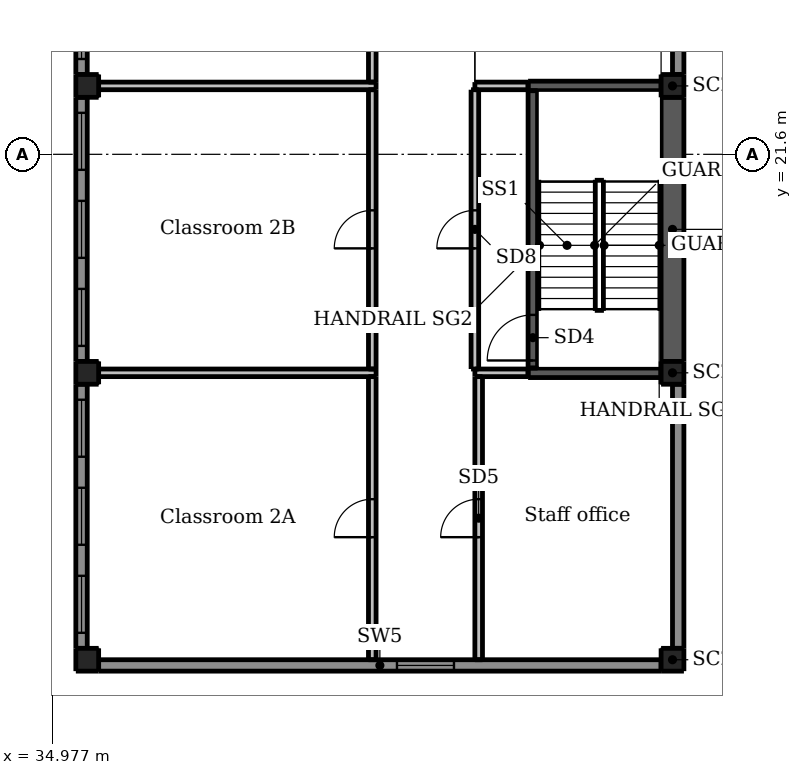
"""IFC4 building model, lengths in metres.
Left out: names, types, materials, properties, quantities, classifications, styles, units other than length and angle.
Written with IfcOpenShell. Run it as: python <this file> out.ifc"""

import sys

from ifc_helpers import new_model, si_unit, direction, frame, frame_2d, origin, origin_2d, place, context, subcontext, project, spatial, rectangle, extrude, element, fill, save


model = new_model("IFC4")
c1 = context("Model", 3, precision=1e-05, world=origin(), true_north=direction((0.0, 1.0)))
c2 = subcontext(c1, "Body", "Model", "MODEL_VIEW")
j1 = project(units=[si_unit("LENGTHUNIT", "METRE"), si_unit("PLANEANGLEUNIT", "RADIAN")], contexts=[c1])
p1 = place(None, origin())
s1 = spatial("IfcSite", under=j1, at=p1, CompositionType="ELEMENT")
p2 = place(p1, origin())
s2 = spatial("IfcBuilding", under=s1, at=p2, CompositionType="ELEMENT")
p3 = place(p2, frame((0.0, 0.0, 10.0)))
s3 = spatial("IfcBuildingStorey", under=s2, at=p3, CompositionType="ELEMENT", Elevation=10.0)
for number, where, z_axis, x_axis in (
    (1, (35.9, 8.3, -0.3), (0.0, 0.0, 1.0), (1.0, 0.0, 0.0)),
    (2, (51.3, 8.3, -0.3), (0.0, 0.0, 1.0), (1.0, 0.0, 0.0)),
    (3, (35.9, 15.85, -0.3), (0.0, 0.0, 1.0), (1.0, 0.0, 0.0)),
    (4, (51.3, 15.85, -0.3), (0.0, 0.0, 1.0), (1.0, 0.0, 0.0)),
    (5, (35.9, 23.4, -0.3), (0.0, 0.0, 1.0), (1.0, 0.0, 0.0)),
    (6, (51.3, 23.4, -0.3), (0.0, 0.0, 1.0), (1.0, 0.0, 0.0)),
):
    element("IfcColumn", number, at=place(p3, frame(where, z_axis=z_axis, x_axis=x_axis)), inside=s3, PredefinedType="COLUMN", context=c2, shape_type="SweptSolid", body=[
        extrude(rectangle(XDim=0.6, YDim=0.6, at=origin_2d()), origin(), (0.0, 0.0, 1.0), 4.5),
    ])
p4 = place(p3, frame((47.625, 15.975, -0.3), z_axis=(0.0, 0.0, 1.0), x_axis=(0.0, 1.0, 0.0)))
e7 = element("IfcWall", 7, at=p4, inside=s3, PredefinedType="SHEAR", context=c2, shape_type="SweptSolid", body=[
    extrude(rectangle(XDim=7.3, YDim=0.25, at=frame_2d((3.65, 0.0))), origin(), (0.0, 0.0, 1.0), 4.5),
])
p5 = place(p4, frame((0.2, 0.0, 0.3)))
e8 = element("IfcOpeningElement", 8, at=p5, cuts=e7, PredefinedType="OPENING", context=c2, shape_type="SweptSolid", body=[
    extrude(rectangle(XDim=1.2, YDim=2.1, at=frame_2d((0.6, 1.05))), frame((0.0, 0.135, 0.0), z_axis=(0.0, -1.0, 0.0), x_axis=(1.0, 0.0, 0.0)), (0.0, 0.0, 1.0), 0.27),
])
for number, where, z_axis, x_axis in (
    (9, (47.5, 15.85, -0.3), (0.0, 0.0, 1.0), (1.0, 0.0, 0.0)),
    (10, (47.5, 23.4, -0.3), (0.0, 0.0, 1.0), (1.0, 0.0, 0.0)),
):
    element("IfcWall", number, at=place(p3, frame(where, z_axis=z_axis, x_axis=x_axis)), inside=s3, PredefinedType="SHEAR", context=c2, shape_type="SweptSolid", body=[
        extrude(rectangle(XDim=3.5, YDim=0.25, at=frame_2d((1.75, 0.0))), origin(), (0.0, 0.0, 1.0), 4.5),
    ])
p6 = place(p3, frame((51.3, 16.15, -0.3), z_axis=(0.0, 0.0, 1.0), x_axis=(0.0, 1.0, 0.0)))
e11 = element("IfcWall", 11, at=p6, inside=s3, PredefinedType="SHEAR", context=c2, shape_type="SweptSolid", body=[
    extrude(rectangle(XDim=6.95, YDim=0.6, at=frame_2d((3.475, 0.0))), origin(), (0.0, 0.0, 1.0), 4.5),
])
p7 = place(p3, frame((52.125, 20.0, 0.0), z_axis=(0.0, 0.0, 1.0), x_axis=(0.0, 1.0, 0.0)))
e12 = element("IfcWall", 12, at=p7, inside=s3, PredefinedType="SOLIDWALL", context=c2, shape_type="SweptSolid", body=[
    extrude(rectangle(XDim=9.8, YDim=0.25, at=frame_2d((4.9, 0.0))), origin(), (0.0, 0.0, 1.0), 4.2),
])
p8 = place(p3, frame((35.75, 8.6, 0.0), z_axis=(0.0, 0.0, 1.0), x_axis=(0.0, 1.0, 0.0)))
e13 = element("IfcWall", 13, at=p8, inside=s3, PredefinedType="SOLIDWALL", context=c2, shape_type="SweptSolid", body=[
    extrude(rectangle(XDim=6.95, YDim=0.3, at=frame_2d((3.475, 0.0))), origin(), (0.0, 0.0, 1.0), 3.3),
])
p9 = place(p8, frame((0.408, 0.0, 0.9)))
e14 = element("IfcOpeningElement", 14, at=p9, cuts=e13, PredefinedType="OPENING", context=c2, shape_type="SweptSolid", body=[
    extrude(rectangle(XDim=1.5, YDim=1.5, at=frame_2d((0.75, 0.75))), frame((0.0, 0.16, 0.0), z_axis=(0.0, -1.0, 0.0), x_axis=(1.0, 0.0, 0.0)), (0.0, 0.0, 1.0), 0.32),
])
p10 = place(p8, frame((2.725, 0.0, 0.9)))
e15 = element("IfcOpeningElement", 15, at=p10, cuts=e13, PredefinedType="OPENING", context=c2, shape_type="SweptSolid", body=[
    extrude(rectangle(XDim=1.5, YDim=1.5, at=frame_2d((0.75, 0.75))), frame((0.0, 0.16, 0.0), z_axis=(0.0, -1.0, 0.0), x_axis=(1.0, 0.0, 0.0)), (0.0, 0.0, 1.0), 0.32),
])
p11 = place(p8, frame((5.042, 0.0, 0.9)))
e16 = element("IfcOpeningElement", 16, at=p11, cuts=e13, PredefinedType="OPENING", context=c2, shape_type="SweptSolid", body=[
    extrude(rectangle(XDim=1.5, YDim=1.5, at=frame_2d((0.75, 0.75))), frame((0.0, 0.16, 0.0), z_axis=(0.0, -1.0, 0.0), x_axis=(1.0, 0.0, 0.0)), (0.0, 0.0, 1.0), 0.32),
])
p12 = place(p3, frame((35.75, 16.15, 0.0), z_axis=(0.0, 0.0, 1.0), x_axis=(0.0, 1.0, 0.0)))
e17 = element("IfcWall", 17, at=p12, inside=s3, PredefinedType="SOLIDWALL", context=c2, shape_type="SweptSolid", body=[
    extrude(rectangle(XDim=6.95, YDim=0.3, at=frame_2d((3.475, 0.0))), origin(), (0.0, 0.0, 1.0), 3.3),
])
p13 = place(p12, frame((0.408, 0.0, 0.9)))
e18 = element("IfcOpeningElement", 18, at=p13, cuts=e17, PredefinedType="OPENING", context=c2, shape_type="SweptSolid", body=[
    extrude(rectangle(XDim=1.5, YDim=1.5, at=frame_2d((0.75, 0.75))), frame((0.0, 0.16, 0.0), z_axis=(0.0, -1.0, 0.0), x_axis=(1.0, 0.0, 0.0)), (0.0, 0.0, 1.0), 0.32),
])
p14 = place(p12, frame((2.725, 0.0, 0.9)))
e19 = element("IfcOpeningElement", 19, at=p14, cuts=e17, PredefinedType="OPENING", context=c2, shape_type="SweptSolid", body=[
    extrude(rectangle(XDim=1.5, YDim=1.5, at=frame_2d((0.75, 0.75))), frame((0.0, 0.16, 0.0), z_axis=(0.0, -1.0, 0.0), x_axis=(1.0, 0.0, 0.0)), (0.0, 0.0, 1.0), 0.32),
])
p15 = place(p12, frame((5.042, 0.0, 0.9)))
e20 = element("IfcOpeningElement", 20, at=p15, cuts=e17, PredefinedType="OPENING", context=c2, shape_type="SweptSolid", body=[
    extrude(rectangle(XDim=1.5, YDim=1.5, at=frame_2d((0.75, 0.75))), frame((0.0, 0.16, 0.0), z_axis=(0.0, -1.0, 0.0), x_axis=(1.0, 0.0, 0.0)), (0.0, 0.0, 1.0), 0.32),
])
p16 = place(p3, frame((35.75, 23.7, 0.0), z_axis=(0.0, 0.0, 1.0), x_axis=(0.0, 1.0, 0.0)))
e21 = element("IfcWall", 21, at=p16, inside=s3, PredefinedType="SOLIDWALL", context=c2, shape_type="SweptSolid", body=[
    extrude(rectangle(XDim=6.95, YDim=0.3, at=frame_2d((3.475, 0.0))), origin(), (0.0, 0.0, 1.0), 3.3),
])
p17 = place(p16, frame((0.408, 0.0, 0.9)))
e22 = element("IfcOpeningElement", 22, at=p17, cuts=e21, PredefinedType="OPENING", context=c2, shape_type="SweptSolid", body=[
    extrude(rectangle(XDim=1.5, YDim=1.5, at=frame_2d((0.75, 0.75))), frame((0.0, 0.16, 0.0), z_axis=(0.0, -1.0, 0.0), x_axis=(1.0, 0.0, 0.0)), (0.0, 0.0, 1.0), 0.32),
])
p18 = place(p16, frame((2.725, 0.0, 0.9)))
e23 = element("IfcOpeningElement", 23, at=p18, cuts=e21, PredefinedType="OPENING", context=c2, shape_type="SweptSolid", body=[
    extrude(rectangle(XDim=1.5, YDim=1.5, at=frame_2d((0.75, 0.75))), frame((0.0, 0.16, 0.0), z_axis=(0.0, -1.0, 0.0), x_axis=(1.0, 0.0, 0.0)), (0.0, 0.0, 1.0), 0.32),
])
p19 = place(p16, frame((5.042, 0.0, 0.9)))
e24 = element("IfcOpeningElement", 24, at=p19, cuts=e21, PredefinedType="OPENING", context=c2, shape_type="SweptSolid", body=[
    extrude(rectangle(XDim=1.5, YDim=1.5, at=frame_2d((0.75, 0.75))), frame((0.0, 0.16, 0.0), z_axis=(0.0, -1.0, 0.0), x_axis=(1.0, 0.0, 0.0)), (0.0, 0.0, 1.0), 0.32),
])
p20 = place(p3, frame((36.2, 8.15, 0.0), z_axis=(0.0, 0.0, 1.0), x_axis=(1.0, 0.0, 0.0)))
e25 = element("IfcWall", 25, at=p20, inside=s3, PredefinedType="SOLIDWALL", context=c2, shape_type="SweptSolid", body=[
    extrude(rectangle(XDim=14.8, YDim=0.3, at=frame_2d((7.4, 0.0))), origin(), (0.0, 0.0, 1.0), 3.1),
])
p21 = place(p20, frame((7.85, 0.0, 0.9)))
e26 = element("IfcOpeningElement", 26, at=p21, cuts=e25, PredefinedType="OPENING", context=c2, shape_type="SweptSolid", body=[
    extrude(rectangle(XDim=1.5, YDim=1.5, at=frame_2d((0.75, 0.75))), frame((0.0, 0.16, 0.0), z_axis=(0.0, -1.0, 0.0), x_axis=(1.0, 0.0, 0.0)), (0.0, 0.0, 1.0), 0.32),
])
p22 = place(p3, frame((51.45, 8.6, 0.0), z_axis=(0.0, 0.0, 1.0), x_axis=(0.0, 1.0, 0.0)))
e27 = element("IfcWall", 27, at=p22, inside=s3, PredefinedType="SOLIDWALL", context=c2, shape_type="SweptSolid", body=[
    extrude(rectangle(XDim=6.95, YDim=0.3, at=frame_2d((3.475, 0.0))), origin(), (0.0, 0.0, 1.0), 3.3),
])
p23 = place(p3, frame((51.45, 23.7, 0.0), z_axis=(0.0, 0.0, 1.0), x_axis=(0.0, 1.0, 0.0)))
e28 = element("IfcWall", 28, at=p23, inside=s3, PredefinedType="SOLIDWALL", context=c2, shape_type="SweptSolid", body=[
    extrude(rectangle(XDim=1.85, YDim=0.3, at=frame_2d((0.925, 0.0))), origin(), (0.0, 0.0, 1.0), 3.3),
])
p24 = place(p3, frame((43.4, 8.3, 0.0), z_axis=(0.0, 0.0, 1.0), x_axis=(0.0, 1.0, 0.0)))
e29 = element("IfcWall", 29, at=p24, inside=s3, PredefinedType="PARTITIONING", context=c2, shape_type="SweptSolid", body=[
    extrude(rectangle(XDim=7.45, YDim=0.2, at=frame_2d((3.725, 0.0))), origin(), (0.0, 0.0, 1.0), 3.1),
])
p25 = place(p24, frame((3.225, 0.0, 0.0)))
e30 = element("IfcOpeningElement", 30, at=p25, cuts=e29, PredefinedType="OPENING", context=c2, shape_type="SweptSolid", body=[
    extrude(rectangle(XDim=1.0, YDim=2.1, at=frame_2d((0.5, 1.05))), frame((0.0, 0.11, 0.0), z_axis=(0.0, -1.0, 0.0), x_axis=(1.0, 0.0, 0.0)), (0.0, 0.0, 1.0), 0.22),
])
p26 = place(p3, frame((43.4, 15.95, 0.0), z_axis=(0.0, 0.0, 1.0), x_axis=(0.0, 1.0, 0.0)))
e31 = element("IfcWall", 31, at=p26, inside=s3, PredefinedType="PARTITIONING", context=c2, shape_type="SweptSolid", body=[
    extrude(rectangle(XDim=7.35, YDim=0.2, at=frame_2d((3.675, 0.0))), origin(), (0.0, 0.0, 1.0), 3.1),
])
p27 = place(p26, frame((3.175, 0.0, 0.0)))
e32 = element("IfcOpeningElement", 32, at=p27, cuts=e31, PredefinedType="OPENING", context=c2, shape_type="SweptSolid", body=[
    extrude(rectangle(XDim=1.0, YDim=2.1, at=frame_2d((0.5, 1.05))), frame((0.0, 0.11, 0.0), z_axis=(0.0, -1.0, 0.0), x_axis=(1.0, 0.0, 0.0)), (0.0, 0.0, 1.0), 0.22),
])
p28 = place(p3, frame((43.4, 23.5, 0.0), z_axis=(0.0, 0.0, 1.0), x_axis=(0.0, 1.0, 0.0)))
e33 = element("IfcWall", 33, at=p28, inside=s3, PredefinedType="PARTITIONING", context=c2, shape_type="SweptSolid", body=[
    extrude(rectangle(XDim=7.35, YDim=0.2, at=frame_2d((3.675, 0.0))), origin(), (0.0, 0.0, 1.0), 3.1),
])
p29 = place(p28, frame((3.175, 0.0, 0.0)))
e34 = element("IfcOpeningElement", 34, at=p29, cuts=e33, PredefinedType="OPENING", context=c2, shape_type="SweptSolid", body=[
    extrude(rectangle(XDim=1.0, YDim=2.1, at=frame_2d((0.5, 1.05))), frame((0.0, 0.11, 0.0), z_axis=(0.0, -1.0, 0.0), x_axis=(1.0, 0.0, 0.0)), (0.0, 0.0, 1.0), 0.22),
])
for number, where, z_axis, x_axis in (
    (35, (36.2, 15.85, 0.0), (0.0, 0.0, 1.0), (1.0, 0.0, 0.0)),
    (36, (36.2, 23.4, 0.0), (0.0, 0.0, 1.0), (1.0, 0.0, 0.0)),
):
    element("IfcWall", number, at=place(p3, frame(where, z_axis=z_axis, x_axis=x_axis)), inside=s3, PredefinedType="PARTITIONING", context=c2, shape_type="SweptSolid", body=[
        extrude(rectangle(XDim=7.3, YDim=0.2, at=frame_2d((3.65, 0.0))), origin(), (0.0, 0.0, 1.0), 3.1),
    ])
p30 = place(p3, frame((46.2, 8.3, 0.0), z_axis=(0.0, 0.0, 1.0), x_axis=(0.0, 1.0, 0.0)))
e37 = element("IfcWall", 37, at=p30, inside=s3, PredefinedType="PARTITIONING", context=c2, shape_type="SweptSolid", body=[
    extrude(rectangle(XDim=7.45, YDim=0.2, at=frame_2d((3.725, 0.0))), origin(), (0.0, 0.0, 1.0), 3.1),
])
p31 = place(p30, frame((3.225, 0.0, 0.0)))
e38 = element("IfcOpeningElement", 38, at=p31, cuts=e37, PredefinedType="OPENING", context=c2, shape_type="SweptSolid", body=[
    extrude(rectangle(XDim=1.0, YDim=2.1, at=frame_2d((0.5, 1.05))), frame((0.0, 0.11, 0.0), z_axis=(0.0, -1.0, 0.0), x_axis=(1.0, 0.0, 0.0)), (0.0, 0.0, 1.0), 0.22),
])
for number, where, z_axis, x_axis in (
    (39, (46.1, 15.85, 0.0), (0.0, 0.0, 1.0), (1.0, 0.0, 0.0)),
    (40, (46.1, 23.4, 0.0), (0.0, 0.0, 1.0), (1.0, 0.0, 0.0)),
):
    element("IfcWall", number, at=place(p3, frame(where, z_axis=z_axis, x_axis=x_axis)), inside=s3, PredefinedType="PARTITIONING", context=c2, shape_type="SweptSolid", body=[
        extrude(rectangle(XDim=1.4, YDim=0.2, at=frame_2d((0.7, 0.0))), origin(), (0.0, 0.0, 1.0), 3.1),
    ])
p32 = place(p3, frame((46.1, 15.95, 0.0), z_axis=(0.0, 0.0, 1.0), x_axis=(0.0, 1.0, 0.0)))
e41 = element("IfcWall", 41, at=p32, inside=s3, PredefinedType="PARTITIONING", context=c2, shape_type="SweptSolid", body=[
    extrude(rectangle(XDim=7.35, YDim=0.2, at=frame_2d((3.675, 0.0))), origin(), (0.0, 0.0, 1.0), 3.1),
])
p33 = place(p32, frame((3.175, 0.0, 0.0)))
e42 = element("IfcOpeningElement", 42, at=p33, cuts=e41, PredefinedType="OPENING", context=c2, shape_type="SweptSolid", body=[
    extrude(rectangle(XDim=1.0, YDim=2.1, at=frame_2d((0.5, 1.05))), frame((0.0, 0.11, 0.0), z_axis=(0.0, -1.0, 0.0), x_axis=(1.0, 0.0, 0.0)), (0.0, 0.0, 1.0), 0.22),
])
p34 = place(p9, origin())
e43 = element("IfcWindow", 43, at=p34, inside=s3, PartitioningType="DOUBLE_PANEL_HORIZONTAL", PredefinedType="WINDOW", context=c2, shape_type="SweptSolid", body=[
    extrude(rectangle(XDim=1.5, YDim=1.5, at=frame_2d((0.75, 0.75))), frame((0.0, 0.03, 0.0), z_axis=(0.0, -1.0, 0.0), x_axis=(1.0, 0.0, 0.0)), (0.0, 0.0, 1.0), 0.06),
])
fill(e14, e43)
p35 = place(p10, origin())
e44 = element("IfcWindow", 44, at=p35, inside=s3, PartitioningType="DOUBLE_PANEL_HORIZONTAL", PredefinedType="WINDOW", context=c2, shape_type="SweptSolid", body=[
    extrude(rectangle(XDim=1.5, YDim=1.5, at=frame_2d((0.75, 0.75))), frame((0.0, 0.03, 0.0), z_axis=(0.0, -1.0, 0.0), x_axis=(1.0, 0.0, 0.0)), (0.0, 0.0, 1.0), 0.06),
])
fill(e15, e44)
p36 = place(p11, origin())
e45 = element("IfcWindow", 45, at=p36, inside=s3, PartitioningType="DOUBLE_PANEL_HORIZONTAL", PredefinedType="WINDOW", context=c2, shape_type="SweptSolid", body=[
    extrude(rectangle(XDim=1.5, YDim=1.5, at=frame_2d((0.75, 0.75))), frame((0.0, 0.03, 0.0), z_axis=(0.0, -1.0, 0.0), x_axis=(1.0, 0.0, 0.0)), (0.0, 0.0, 1.0), 0.06),
])
fill(e16, e45)
p37 = place(p13, origin())
e46 = element("IfcWindow", 46, at=p37, inside=s3, PartitioningType="DOUBLE_PANEL_HORIZONTAL", PredefinedType="WINDOW", context=c2, shape_type="SweptSolid", body=[
    extrude(rectangle(XDim=1.5, YDim=1.5, at=frame_2d((0.75, 0.75))), frame((0.0, 0.03, 0.0), z_axis=(0.0, -1.0, 0.0), x_axis=(1.0, 0.0, 0.0)), (0.0, 0.0, 1.0), 0.06),
])
fill(e18, e46)
p38 = place(p14, origin())
e47 = element("IfcWindow", 47, at=p38, inside=s3, PartitioningType="DOUBLE_PANEL_HORIZONTAL", PredefinedType="WINDOW", context=c2, shape_type="SweptSolid", body=[
    extrude(rectangle(XDim=1.5, YDim=1.5, at=frame_2d((0.75, 0.75))), frame((0.0, 0.03, 0.0), z_axis=(0.0, -1.0, 0.0), x_axis=(1.0, 0.0, 0.0)), (0.0, 0.0, 1.0), 0.06),
])
fill(e19, e47)
p39 = place(p15, origin())
e48 = element("IfcWindow", 48, at=p39, inside=s3, PartitioningType="DOUBLE_PANEL_HORIZONTAL", PredefinedType="WINDOW", context=c2, shape_type="SweptSolid", body=[
    extrude(rectangle(XDim=1.5, YDim=1.5, at=frame_2d((0.75, 0.75))), frame((0.0, 0.03, 0.0), z_axis=(0.0, -1.0, 0.0), x_axis=(1.0, 0.0, 0.0)), (0.0, 0.0, 1.0), 0.06),
])
fill(e20, e48)
p40 = place(p17, origin())
e49 = element("IfcWindow", 49, at=p40, inside=s3, PartitioningType="DOUBLE_PANEL_HORIZONTAL", PredefinedType="WINDOW", context=c2, shape_type="SweptSolid", body=[
    extrude(rectangle(XDim=1.5, YDim=1.5, at=frame_2d((0.75, 0.75))), frame((0.0, 0.03, 0.0), z_axis=(0.0, -1.0, 0.0), x_axis=(1.0, 0.0, 0.0)), (0.0, 0.0, 1.0), 0.06),
])
fill(e22, e49)
p41 = place(p21, origin())
e50 = element("IfcWindow", 50, at=p41, inside=s3, PartitioningType="DOUBLE_PANEL_HORIZONTAL", PredefinedType="WINDOW", context=c2, shape_type="SweptSolid", body=[
    extrude(rectangle(XDim=1.5, YDim=1.5, at=frame_2d((0.75, 0.75))), frame((0.0, 0.03, 0.0), z_axis=(0.0, -1.0, 0.0), x_axis=(1.0, 0.0, 0.0)), (0.0, 0.0, 1.0), 0.06),
])
fill(e26, e50)
p42 = place(p25, origin())
e51 = element("IfcDoor", 51, at=p42, inside=s3, OperationType="SINGLE_SWING_LEFT", PredefinedType="DOOR", context=c2, shape_type="SweptSolid", body=[
    extrude(rectangle(XDim=1.0, YDim=2.1, at=frame_2d((0.5, 1.05))), frame((0.0, 0.025, 0.0), z_axis=(0.0, -1.0, 0.0), x_axis=(1.0, 0.0, 0.0)), (0.0, 0.0, 1.0), 0.05),
])
fill(e30, e51)
p43 = place(p27, origin())
e52 = element("IfcDoor", 52, at=p43, inside=s3, OperationType="SINGLE_SWING_LEFT", PredefinedType="DOOR", context=c2, shape_type="SweptSolid", body=[
    extrude(rectangle(XDim=1.0, YDim=2.1, at=frame_2d((0.5, 1.05))), frame((0.0, 0.025, 0.0), z_axis=(0.0, -1.0, 0.0), x_axis=(1.0, 0.0, 0.0)), (0.0, 0.0, 1.0), 0.05),
])
fill(e32, e52)
p44 = place(p31, origin())
e53 = element("IfcDoor", 53, at=p44, inside=s3, OperationType="SINGLE_SWING_LEFT", PredefinedType="DOOR", context=c2, shape_type="SweptSolid", body=[
    extrude(rectangle(XDim=1.0, YDim=2.1, at=frame_2d((0.5, 1.05))), frame((0.0, 0.025, 0.0), z_axis=(0.0, -1.0, 0.0), x_axis=(1.0, 0.0, 0.0)), (0.0, 0.0, 1.0), 0.05),
])
fill(e38, e53)
p45 = place(p33, origin())
e54 = element("IfcDoor", 54, at=p45, inside=s3, OperationType="SINGLE_SWING_LEFT", PredefinedType="DOOR", context=c2, shape_type="SweptSolid", body=[
    extrude(rectangle(XDim=1.0, YDim=2.1, at=frame_2d((0.5, 1.05))), frame((0.0, 0.025, 0.0), z_axis=(0.0, -1.0, 0.0), x_axis=(1.0, 0.0, 0.0)), (0.0, 0.0, 1.0), 0.05),
])
fill(e42, e54)
p46 = place(p5, origin())
e55 = element("IfcDoor", 55, at=p46, inside=s3, OperationType="SINGLE_SWING_LEFT", PredefinedType="DOOR", context=c2, shape_type="SweptSolid", body=[
    extrude(rectangle(XDim=1.2, YDim=2.1, at=frame_2d((0.6, 1.05))), frame((0.0, 0.025, 0.0), z_axis=(0.0, -1.0, 0.0), x_axis=(1.0, 0.0, 0.0)), (0.0, 0.0, 1.0), 0.05),
])
fill(e8, e55)
save(model, sys.argv[1])
